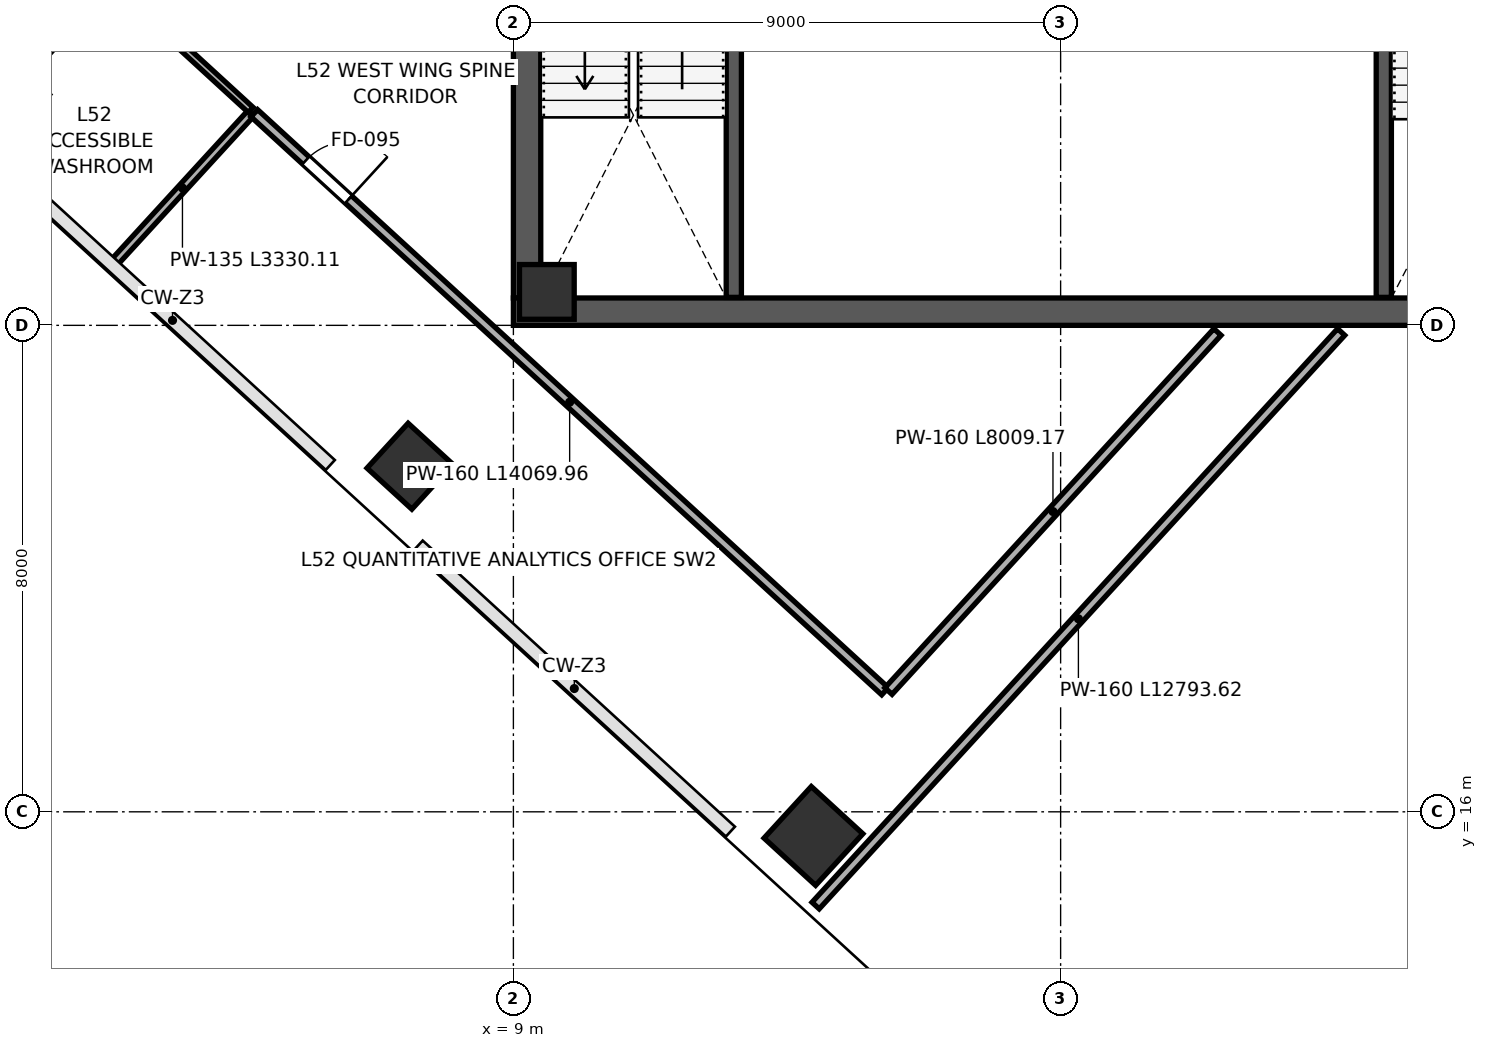
"""IFC4 building model, lengths in metres.
Left out: names, types, materials, properties, quantities, classifications, styles, units other than length and angle.
Written with IfcOpenShell. Run it as: python <this file> out.ifc"""

import sys

from ifc_helpers import new_model, si_unit, direction, frame, frame_2d, origin, origin_2d, place, context, subcontext, project, spatial, rectangle, extrude, source, transform, mapped, element, fill, save


model = new_model("IFC4")
c1 = context("Model", 3, precision=1e-05, world=origin(), true_north=direction((0.0, 1.0)))
c2 = subcontext(c1, "Body", "Model", "MODEL_VIEW")
j1 = project(units=[si_unit("LENGTHUNIT", "METRE"), si_unit("PLANEANGLEUNIT", "RADIAN")], contexts=[c1])
p1 = place(None, origin())
s1 = spatial("IfcSite", under=j1, at=p1, CompositionType="ELEMENT")
p2 = place(p1, origin())
s2 = spatial("IfcBuilding", under=s1, at=p2, CompositionType="ELEMENT")
p3 = place(p2, frame((0.0, 0.0, 233.2)))
s3 = spatial("IfcBuildingStorey", under=s2, at=p3, CompositionType="ELEMENT", Elevation=233.2)
m1 = source(origin(), c2, "Body", "SweptSolid", [
    extrude(rectangle(XDim=0.9, YDim=0.9, at=origin_2d()), origin(), (0.0, 0.0, 1.0), 4.198),
])
p4 = place(p3, frame((9.55, 24.55, 0.001), z_axis=(0.0, 0.0, 1.0), x_axis=(1.0, 0.0, 0.0)))
e1 = element("IfcColumn", 1, at=p4, inside=s3, PredefinedType="COLUMN", context=c2, shape_type="MappedRepresentation", body=[
    mapped(m1, transform((0.0, 0.0, 0.0), scale=1.0)),
])
m2 = source(origin(), c2, "Body", "SweptSolid", [
    extrude(rectangle(XDim=1.0, YDim=1.0, at=origin_2d()), origin(), (0.0, 0.0, 1.0), 4.198),
])
p5 = place(p3, frame((7.299, 21.683, 0.001), z_axis=(0.0, 0.0, 1.0), x_axis=(-0.73727733681, 0.675590207616, 0.0)))
e2 = element("IfcColumn", 2, at=p5, inside=s3, PredefinedType="COLUMN", context=c2, shape_type="MappedRepresentation", body=[
    mapped(m2, transform((0.0, 0.0, 0.0), scale=1.0)),
])
m3 = source(origin(), c2, "Body", "SweptSolid", [
    extrude(rectangle(XDim=1.15, YDim=1.15, at=origin_2d()), origin(), (0.0, 0.0, 1.0), 4.198),
])
p6 = place(p3, frame((13.935, 15.603, 0.001), z_axis=(0.0, 0.0, 1.0), x_axis=(-0.73727733681, 0.675590207616, 0.0)))
e3 = element("IfcColumn", 3, at=p6, inside=s3, PredefinedType="COLUMN", context=c2, shape_type="MappedRepresentation", body=[
    mapped(m3, transform((0.0, 0.0, 0.0), scale=1.0)),
])
p7 = place(p3, frame((9.225, 24.45, 0.0), z_axis=(0.0, 0.0, 1.0), x_axis=(0.0, 1.0, 0.0)))
e4 = element("IfcWall", 4, at=p7, inside=s3, PredefinedType="SHEAR", context=c2, shape_type="SweptSolid", body=[
    extrude(rectangle(XDim=15.1, YDim=0.45, at=frame_2d((7.55, 0.0))), origin(), (0.0, 0.0, 1.0), 3.96),
])
p8 = place(p7, frame((8.7, 0.0, 0.0)))
e5 = element("IfcOpeningElement", 5, at=p8, cuts=e4, PredefinedType="OPENING", context=c2, shape_type="SweptSolid", body=[
    extrude(rectangle(XDim=1.15, YDim=2.2, at=frame_2d((0.575, 1.1))), frame((0.0, 0.235, 0.0), z_axis=(0.0, -1.0, 0.0), x_axis=(1.0, 0.0, 0.0)), (0.0, 0.0, 1.0), 0.47),
])
p9 = place(p3, frame((9.0, 24.225, 0.0), z_axis=(0.0, 0.0, 1.0), x_axis=(1.0, 0.0, 0.0)))
e6 = element("IfcWall", 6, at=p9, inside=s3, PredefinedType="SHEAR", context=c2, shape_type="SweptSolid", body=[
    extrude(rectangle(XDim=18.0, YDim=0.45, at=frame_2d((9.0, 0.0))), origin(), (0.0, 0.0, 1.0), 3.96),
])
p10 = place(p3, frame((12.625, 24.46, 0.0), z_axis=(0.0, 0.0, 1.0), x_axis=(0.0, 1.0, 0.0)))
e7 = element("IfcWall", 7, at=p10, inside=s3, PredefinedType="SHEAR", context=c2, shape_type="SweptSolid", body=[
    extrude(rectangle(XDim=7.49, YDim=0.25, at=frame_2d((3.745, 0.0))), origin(), (0.0, 0.0, 1.0), 3.96),
])
p11 = place(p10, frame((5.85, 0.0, 0.0)))
e8 = element("IfcOpeningElement", 8, at=p11, cuts=e7, PredefinedType="OPENING", context=c2, shape_type="SweptSolid", body=[
    extrude(rectangle(XDim=1.15, YDim=2.2, at=frame_2d((0.575, 1.1))), frame((0.0, 0.135, 0.0), z_axis=(0.0, -1.0, 0.0), x_axis=(1.0, 0.0, 0.0)), (0.0, 0.0, 1.0), 0.27),
])
p12 = place(p3, frame((23.315, 24.46, 0.0), z_axis=(0.0, 0.0, 1.0), x_axis=(0.0, 1.0, 0.0)))
e9 = element("IfcWall", 9, at=p12, inside=s3, PredefinedType="SHEAR", context=c2, shape_type="SweptSolid", body=[
    extrude(rectangle(XDim=7.49, YDim=0.25, at=frame_2d((3.745, 0.0))), origin(), (0.0, 0.0, 1.0), 3.96),
])
p13 = place(p3, frame((0.11, 27.159, 0.0), z_axis=(0.0, 0.0, 1.0), x_axis=(0.675605101048, 0.737263689217, 0.0)))
e10 = element("IfcWall", 10, at=p13, inside=s3, PredefinedType="PARTITIONING", context=c2, shape_type="SweptSolid", body=[
    extrude(rectangle(XDim=3.33, YDim=0.1, at=frame_2d((1.665, 0.0))), origin(), (0.0, 0.0, 1.0), 3.195),
])
p14 = place(p3, frame((2.432, 25.031, 0.0), z_axis=(0.0, 0.0, 1.0), x_axis=(0.675605101048, 0.737263689217, 0.0)))
e11 = element("IfcWall", 11, at=p14, inside=s3, PredefinedType="PARTITIONING", context=c2, shape_type="SweptSolid", body=[
    extrude(rectangle(XDim=3.33, YDim=0.135, at=frame_2d((1.665, 0.0))), origin(), (0.0, 0.0, 1.0), 3.195),
])
p15 = place(p3, frame((-0.571, 32.354, 0.0), z_axis=(0.0, 0.0, 1.0), x_axis=(0.737285035525, -0.675581805846, 0.0)))
e12 = element("IfcWall", 12, at=p15, inside=s3, PredefinedType="PARTITIONING", context=c2, shape_type="SweptSolid", body=[
    extrude(rectangle(XDim=7.122, YDim=0.115, at=frame_2d((3.561, 0.0))), origin(), (0.0, 0.0, 1.0), 3.96),
])
p16 = place(p15, frame((2.6, 0.0, 0.0)))
e13 = element("IfcOpeningElement", 13, at=p16, cuts=e12, PredefinedType="OPENING", context=c2, shape_type="SweptSolid", body=[
    extrude(rectangle(XDim=0.9, YDim=2.15, at=frame_2d((0.45, 1.075))), frame((0.0, 0.067, 0.0), z_axis=(0.0, -1.0, 0.0), x_axis=(1.0, 0.0, 0.0)), (0.0, 0.0, 1.0), 0.135),
])
p17 = place(p15, frame((4.7, 0.0, 0.0)))
e14 = element("IfcOpeningElement", 14, at=p17, cuts=e12, PredefinedType="OPENING", context=c2, shape_type="SweptSolid", body=[
    extrude(rectangle(XDim=0.95, YDim=2.15, at=frame_2d((0.475, 1.075))), frame((0.0, 0.067, 0.0), z_axis=(0.0, -1.0, 0.0), x_axis=(1.0, 0.0, 0.0)), (0.0, 0.0, 1.0), 0.135),
])
p18 = place(p3, frame((4.739, 27.489, 0.0), z_axis=(0.0, 0.0, 1.0), x_axis=(0.737276572642, -0.675591041558, 0.0)))
e15 = element("IfcWall", 15, at=p18, inside=s3, PredefinedType="PARTITIONING", context=c2, shape_type="SweptSolid", body=[
    extrude(rectangle(XDim=14.07, YDim=0.16, at=frame_2d((7.035, 0.0))), origin(), (0.0, 0.0, 1.0), 3.96),
])
p19 = place(p18, frame((1.15, 0.0, 0.0)))
e16 = element("IfcOpeningElement", 16, at=p19, cuts=e15, PredefinedType="OPENING", context=c2, shape_type="SweptSolid", body=[
    extrude(rectangle(XDim=0.95, YDim=2.15, at=frame_2d((0.475, 1.075))), frame((0.0, 0.09, 0.0), z_axis=(0.0, -1.0, 0.0), x_axis=(1.0, 0.0, 0.0)), (0.0, 0.0, 1.0), 0.18),
])
p20 = place(p3, frame((15.168, 17.986, 0.0), z_axis=(0.0, 0.0, 1.0), x_axis=(0.675616954369, 0.737252827034, 0.0)))
e17 = element("IfcWall", 17, at=p20, inside=s3, PredefinedType="PARTITIONING", context=c2, shape_type="SweptSolid", body=[
    extrude(rectangle(XDim=8.009, YDim=0.16, at=frame_2d((4.005, 0.0))), origin(), (0.0, 0.0, 1.0), 3.96),
])
p21 = place(p3, frame((13.971, 14.458, 0.0), z_axis=(0.0, 0.0, 1.0), x_axis=(0.675595861889, 0.737272155583, 0.0)))
e18 = element("IfcWall", 18, at=p21, inside=s3, PredefinedType="PARTITIONING", context=c2, shape_type="SweptSolid", body=[
    extrude(rectangle(XDim=12.794, YDim=0.16, at=frame_2d((6.397, 0.0))), origin(), (0.0, 0.0, 1.0), 3.96),
])
m4 = source(origin(), c2, "Body", "SweptSolid", [
    extrude(rectangle(XDim=0.95, YDim=2.15, at=frame_2d((0.475, 1.075))), frame((0.0, 0.025, 0.0), z_axis=(0.0, -1.0, 0.0), x_axis=(1.0, 0.0, 0.0)), (0.0, 0.0, 1.0), 0.05),
])
p22 = place(p19, origin())
e19 = element("IfcDoor", 19, at=p22, inside=s3, OperationType="SINGLE_SWING_RIGHT", PredefinedType="DOOR", context=c2, shape_type="MappedRepresentation", body=[
    mapped(m4, transform((0.0, 0.0, 0.0), scale=1.0)),
])
fill(e16, e19)
save(model, sys.argv[1])
